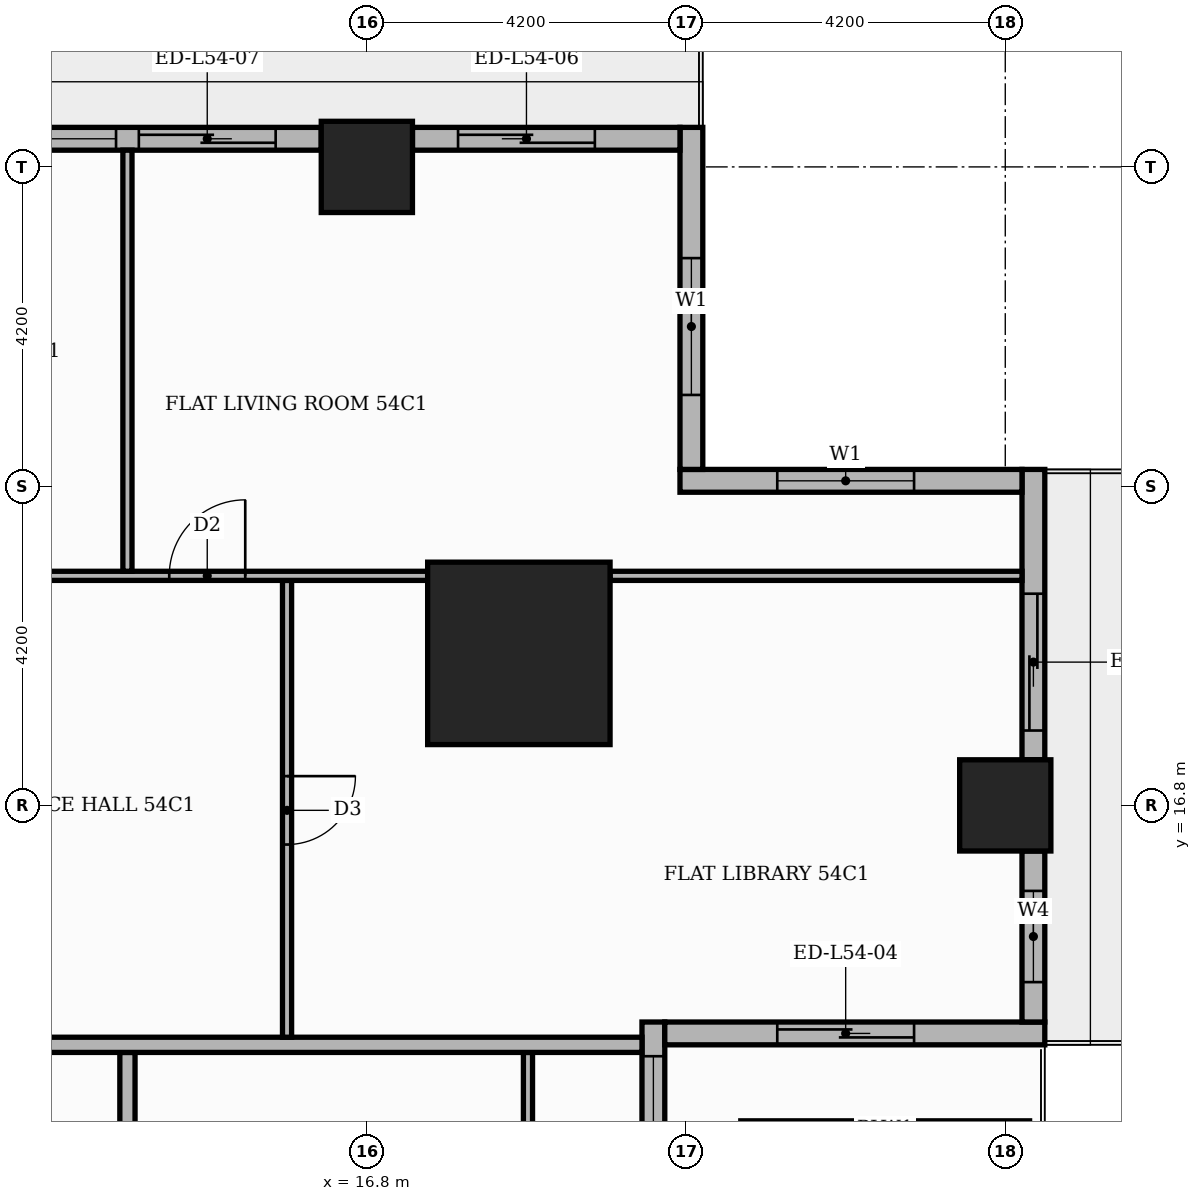
"""IFC4 building model, lengths in metres.
Left out: names, types, materials, properties, quantities, classifications, styles, units other than length and angle.
Written with IfcOpenShell. Run it as: python <this file> out.ifc"""

import sys

from ifc_helpers import new_model, si_unit, direction, frame, frame_2d, origin, origin_2d, place, context, subcontext, project, spatial, rectangle, extrude, element, fill, save


model = new_model("IFC4")
c1 = context("Model", 3, precision=1e-05, world=origin(), true_north=direction((0.0, 1.0)))
c2 = subcontext(c1, "Body", "Model", "MODEL_VIEW")
j1 = project(units=[si_unit("LENGTHUNIT", "METRE"), si_unit("PLANEANGLEUNIT", "RADIAN")], contexts=[c1])
p1 = place(None, origin())
s1 = spatial("IfcSite", under=j1, at=p1, CompositionType="ELEMENT")
p2 = place(p1, origin())
s2 = spatial("IfcBuilding", under=s1, at=p2, CompositionType="ELEMENT")
p3 = place(p2, frame((0.0, 0.0, 227.4)))
s3 = spatial("IfcBuildingStorey", under=s2, at=p3, CompositionType="ELEMENT", Elevation=227.4)
p4 = place(p3, frame((18.8, 18.8, 0.0), z_axis=(0.0, 0.0, 1.0), x_axis=(1.0, 0.0, 0.0)))
e1 = element("IfcColumn", 1, at=p4, inside=s3, PredefinedType="COLUMN", context=c2, shape_type="SweptSolid", body=[
    extrude(rectangle(XDim=2.4, YDim=2.4, at=origin_2d()), origin(), (0.0, 0.0, 1.0), 3.9),
])
for number, where, z_axis, x_axis in (
    (2, (25.2, 16.8, 0.0), (0.0, 0.0, 1.0), (1.0, 0.0, 0.0)),
    (3, (16.8, 25.2, 0.0), (0.0, 0.0, 1.0), (1.0, 0.0, 0.0)),
):
    element("IfcColumn", number, at=place(p3, frame(where, z_axis=z_axis, x_axis=x_axis)), inside=s3, PredefinedType="COLUMN", context=c2, shape_type="SweptSolid", body=[
        extrude(rectangle(XDim=1.2, YDim=1.2, at=origin_2d()), origin(), (0.0, 0.0, 1.0), 3.9),
    ])
p5 = place(p3, frame((20.57, -13.65, 0.0), z_axis=(0.0, 0.0, 1.0), x_axis=(0.0, 1.0, 0.0)))
e4 = element("IfcWall", 4, at=p5, inside=s3, PredefinedType="STANDARD", context=c2, shape_type="SweptSolid", body=[
    extrude(rectangle(XDim=27.6, YDim=0.3, at=frame_2d((13.8, 0.0))), origin(), (0.0, 0.0, 1.0), 3.48),
])
p6 = place(p5, frame((0.15, 0.0, 0.9)))
e5 = element("IfcOpeningElement", 5, at=p6, cuts=e4, PredefinedType="OPENING", context=c2, shape_type="SweptSolid", body=[
    extrude(rectangle(XDim=1.8, YDim=2.1, at=frame_2d((0.9, 1.05))), frame((0.0, 0.16, 0.0), z_axis=(0.0, -1.0, 0.0), x_axis=(1.0, 0.0, 0.0)), (0.0, 0.0, 1.0), 0.32),
])
p7 = place(p5, frame((2.25, 0.0, 0.9)))
e6 = element("IfcOpeningElement", 6, at=p7, cuts=e4, PredefinedType="OPENING", context=c2, shape_type="SweptSolid", body=[
    extrude(rectangle(XDim=6.0, YDim=2.1, at=frame_2d((3.0, 1.05))), frame((0.0, 0.16, 0.0), z_axis=(0.0, -1.0, 0.0), x_axis=(1.0, 0.0, 0.0)), (0.0, 0.0, 1.0), 0.32),
])
p8 = place(p5, frame((8.55, 0.0, 0.9)))
e7 = element("IfcOpeningElement", 7, at=p8, cuts=e4, PredefinedType="OPENING", context=c2, shape_type="SweptSolid", body=[
    extrude(rectangle(XDim=6.0, YDim=2.1, at=frame_2d((3.0, 1.05))), frame((0.0, 0.16, 0.0), z_axis=(0.0, -1.0, 0.0), x_axis=(1.0, 0.0, 0.0)), (0.0, 0.0, 1.0), 0.32),
])
p9 = place(p5, frame((14.85, 0.0, 0.9)))
e8 = element("IfcOpeningElement", 8, at=p9, cuts=e4, PredefinedType="OPENING", context=c2, shape_type="SweptSolid", body=[
    extrude(rectangle(XDim=6.0, YDim=2.1, at=frame_2d((3.0, 1.05))), frame((0.0, 0.16, 0.0), z_axis=(0.0, -1.0, 0.0), x_axis=(1.0, 0.0, 0.0)), (0.0, 0.0, 1.0), 0.32),
])
p10 = place(p5, frame((21.15, 0.0, 0.9)))
e9 = element("IfcOpeningElement", 9, at=p10, cuts=e4, PredefinedType="OPENING", context=c2, shape_type="SweptSolid", body=[
    extrude(rectangle(XDim=6.0, YDim=2.1, at=frame_2d((3.0, 1.05))), frame((0.0, 0.16, 0.0), z_axis=(0.0, -1.0, 0.0), x_axis=(1.0, 0.0, 0.0)), (0.0, 0.0, 1.0), 0.32),
])
p11 = place(p3, frame((20.72, 13.8, 0.0), z_axis=(0.0, 0.0, 1.0), x_axis=(1.0, 0.0, 0.0)))
e10 = element("IfcWall", 10, at=p11, inside=s3, PredefinedType="STANDARD", context=c2, shape_type="SweptSolid", body=[
    extrude(rectangle(XDim=5.0, YDim=0.3, at=frame_2d((2.5, 0.0))), origin(), (0.0, 0.0, 1.0), 3.48),
])
p12 = place(p11, frame((1.48, 0.0, 0.0)))
e11 = element("IfcOpeningElement", 11, at=p12, cuts=e10, PredefinedType="OPENING", context=c2, shape_type="SweptSolid", body=[
    extrude(rectangle(XDim=1.8, YDim=2.4, at=frame_2d((0.9, 1.2))), frame((0.0, 0.16, 0.0), z_axis=(0.0, -1.0, 0.0), x_axis=(1.0, 0.0, 0.0)), (0.0, 0.0, 1.0), 0.32),
])
p13 = place(p3, frame((25.57, 13.95, 0.0), z_axis=(0.0, 0.0, 1.0), x_axis=(0.0, 1.0, 0.0)))
e12 = element("IfcWall", 12, at=p13, inside=s3, PredefinedType="STANDARD", context=c2, shape_type="SweptSolid", body=[
    extrude(rectangle(XDim=2.25, YDim=0.3, at=frame_2d((1.125, 0.0))), origin(), (0.0, 0.0, 1.0), 3.48),
])
p14 = place(p13, frame((0.525, 0.0, 0.9)))
e13 = element("IfcOpeningElement", 13, at=p14, cuts=e12, PredefinedType="OPENING", context=c2, shape_type="SweptSolid", body=[
    extrude(rectangle(XDim=1.2, YDim=2.1, at=frame_2d((0.6, 1.05))), frame((0.0, 0.16, 0.0), z_axis=(0.0, -1.0, 0.0), x_axis=(1.0, 0.0, 0.0)), (0.0, 0.0, 1.0), 0.32),
])
p15 = place(p3, frame((25.57, 17.4, 0.0), z_axis=(0.0, 0.0, 1.0), x_axis=(0.0, 1.0, 0.0)))
e14 = element("IfcWall", 14, at=p15, inside=s3, PredefinedType="STANDARD", context=c2, shape_type="SweptSolid", body=[
    extrude(rectangle(XDim=3.82, YDim=0.3, at=frame_2d((1.91, 0.0))), origin(), (0.0, 0.0, 1.0), 3.48),
])
p16 = place(p15, frame((0.385, 0.0, 0.0)))
e15 = element("IfcOpeningElement", 15, at=p16, cuts=e14, PredefinedType="OPENING", context=c2, shape_type="SweptSolid", body=[
    extrude(rectangle(XDim=1.8, YDim=2.4, at=frame_2d((0.9, 1.2))), frame((0.0, 0.16, 0.0), z_axis=(0.0, -1.0, 0.0), x_axis=(1.0, 0.0, 0.0)), (0.0, 0.0, 1.0), 0.32),
])
p17 = place(p3, frame((25.42, 21.07, 0.0), z_axis=(0.0, 0.0, 1.0), x_axis=(-1.0, 0.0, 0.0)))
e16 = element("IfcWall", 16, at=p17, inside=s3, PredefinedType="STANDARD", context=c2, shape_type="SweptSolid", body=[
    extrude(rectangle(XDim=4.5, YDim=0.3, at=frame_2d((2.25, 0.0))), origin(), (0.0, 0.0, 1.0), 3.48),
])
p18 = place(p17, frame((1.42, 0.0, 0.9)))
e17 = element("IfcOpeningElement", 17, at=p18, cuts=e16, PredefinedType="OPENING", context=c2, shape_type="SweptSolid", body=[
    extrude(rectangle(XDim=1.8, YDim=2.1, at=frame_2d((0.9, 1.05))), frame((0.0, 0.16, 0.0), z_axis=(0.0, -1.0, 0.0), x_axis=(1.0, 0.0, 0.0)), (0.0, 0.0, 1.0), 0.32),
])
p19 = place(p3, frame((21.07, 21.22, 0.0), z_axis=(0.0, 0.0, 1.0), x_axis=(0.0, 1.0, 0.0)))
e18 = element("IfcWall", 18, at=p19, inside=s3, PredefinedType="STANDARD", context=c2, shape_type="SweptSolid", body=[
    extrude(rectangle(XDim=4.5, YDim=0.3, at=frame_2d((2.25, 0.0))), origin(), (0.0, 0.0, 1.0), 3.48),
])
p20 = place(p19, frame((0.98, 0.0, 0.9)))
e19 = element("IfcOpeningElement", 19, at=p20, cuts=e18, PredefinedType="OPENING", context=c2, shape_type="SweptSolid", body=[
    extrude(rectangle(XDim=1.8, YDim=2.1, at=frame_2d((0.9, 1.05))), frame((0.0, 0.16, 0.0), z_axis=(0.0, -1.0, 0.0), x_axis=(1.0, 0.0, 0.0)), (0.0, 0.0, 1.0), 0.32),
])
p21 = place(p3, frame((20.92, 25.57, 0.0), z_axis=(0.0, 0.0, 1.0), x_axis=(-1.0, 0.0, 0.0)))
e20 = element("IfcWall", 20, at=p21, inside=s3, PredefinedType="STANDARD", context=c2, shape_type="SweptSolid", body=[
    extrude(rectangle(XDim=3.52, YDim=0.3, at=frame_2d((1.76, 0.0))), origin(), (0.0, 0.0, 1.0), 3.48),
])
p22 = place(p21, frame((1.12, 0.0, 0.0)))
e21 = element("IfcOpeningElement", 21, at=p22, cuts=e20, PredefinedType="OPENING", context=c2, shape_type="SweptSolid", body=[
    extrude(rectangle(XDim=1.8, YDim=2.4, at=frame_2d((0.9, 1.2))), frame((0.0, 0.16, 0.0), z_axis=(0.0, -1.0, 0.0), x_axis=(1.0, 0.0, 0.0)), (0.0, 0.0, 1.0), 0.32),
])
p23 = place(p3, frame((16.2, 25.57, 0.0), z_axis=(0.0, 0.0, 1.0), x_axis=(-1.0, 0.0, 0.0)))
e22 = element("IfcWall", 22, at=p23, inside=s3, PredefinedType="STANDARD", context=c2, shape_type="SweptSolid", body=[
    extrude(rectangle(XDim=7.2, YDim=0.3, at=frame_2d((3.6, 0.0))), origin(), (0.0, 0.0, 1.0), 3.48),
])
p24 = place(p23, frame((0.6, 0.0, 0.0)))
e23 = element("IfcOpeningElement", 23, at=p24, cuts=e22, PredefinedType="OPENING", context=c2, shape_type="SweptSolid", body=[
    extrude(rectangle(XDim=1.8, YDim=2.4, at=frame_2d((0.9, 1.2))), frame((0.0, 0.16, 0.0), z_axis=(0.0, -1.0, 0.0), x_axis=(1.0, 0.0, 0.0)), (0.0, 0.0, 1.0), 0.32),
])
p25 = place(p23, frame((2.7, 0.0, 0.9)))
e24 = element("IfcOpeningElement", 24, at=p25, cuts=e22, PredefinedType="OPENING", context=c2, shape_type="SweptSolid", body=[
    extrude(rectangle(XDim=3.9, YDim=2.1, at=frame_2d((1.95, 1.05))), frame((0.0, 0.16, 0.0), z_axis=(0.0, -1.0, 0.0), x_axis=(1.0, 0.0, 0.0)), (0.0, 0.0, 1.0), 0.32),
])
p26 = place(p3, frame((18.92, 9.36, 0.0), z_axis=(0.0, 0.0, 1.0), x_axis=(0.0, 1.0, 0.0)))
e25 = element("IfcWall", 25, at=p26, inside=s3, PredefinedType="PARTITIONING", context=c2, shape_type="SweptSolid", body=[
    extrude(rectangle(XDim=4.19, YDim=0.12, at=frame_2d((2.095, 0.0))), origin(), (0.0, 0.0, 1.0), 3.48),
])
p27 = place(p26, frame((1.665, 0.0, 0.0)))
e26 = element("IfcOpeningElement", 26, at=p27, cuts=e25, PredefinedType="OPENING", context=c2, shape_type="SweptSolid", body=[
    extrude(rectangle(XDim=0.9, YDim=2.1, at=frame_2d((0.45, 1.05))), frame((0.0, 0.07, 0.0), z_axis=(0.0, -1.0, 0.0), x_axis=(1.0, 0.0, 0.0)), (0.0, 0.0, 1.0), 0.14),
])
p28 = place(p3, frame((13.65, 11.1, 0.0), z_axis=(0.0, 0.0, 1.0), x_axis=(0.0, 1.0, 0.0)))
e27 = element("IfcWall", 27, at=p28, inside=s3, PredefinedType="PARTITIONING", context=c2, shape_type="SweptSolid", body=[
    extrude(rectangle(XDim=2.45, YDim=0.2, at=frame_2d((1.225, 0.0))), origin(), (0.0, 0.0, 1.0), 3.48),
])
p29 = place(p3, frame((-13.65, 13.65, 0.0), z_axis=(0.0, 0.0, 1.0), x_axis=(1.0, 0.0, 0.0)))
e28 = element("IfcWall", 28, at=p29, inside=s3, PredefinedType="PARTITIONING", context=c2, shape_type="SweptSolid", body=[
    extrude(rectangle(XDim=34.07, YDim=0.2, at=frame_2d((17.035, 0.0))), origin(), (0.0, 0.0, 1.0), 3.48),
])
p30 = place(p29, frame((24.65, 0.0, 0.0)))
e29 = element("IfcOpeningElement", 29, at=p30, cuts=e28, PredefinedType="OPENING", context=c2, shape_type="SweptSolid", body=[
    extrude(rectangle(XDim=1.1, YDim=2.4, at=frame_2d((0.55, 1.2))), frame((0.0, 0.11, 0.0), z_axis=(0.0, -1.0, 0.0), x_axis=(1.0, 0.0, 0.0)), (0.0, 0.0, 1.0), 0.22),
])
p31 = place(p3, frame((15.75, 13.75, 0.0), z_axis=(0.0, 0.0, 1.0), x_axis=(0.0, 1.0, 0.0)))
e30 = element("IfcWall", 30, at=p31, inside=s3, PredefinedType="PARTITIONING", context=c2, shape_type="SweptSolid", body=[
    extrude(rectangle(XDim=6.01, YDim=0.12, at=frame_2d((3.005, 0.0))), origin(), (0.0, 0.0, 1.0), 3.48),
])
p32 = place(p31, frame((2.535, 0.0, 0.0)))
e31 = element("IfcOpeningElement", 31, at=p32, cuts=e30, PredefinedType="OPENING", context=c2, shape_type="SweptSolid", body=[
    extrude(rectangle(XDim=0.9, YDim=2.1, at=frame_2d((0.45, 1.05))), frame((0.0, 0.07, 0.0), z_axis=(0.0, -1.0, 0.0), x_axis=(1.0, 0.0, 0.0)), (0.0, 0.0, 1.0), 0.14),
])
p33 = place(p3, frame((-13.55, 19.82, 0.0), z_axis=(0.0, 0.0, 1.0), x_axis=(1.0, 0.0, 0.0)))
e32 = element("IfcWall", 32, at=p33, inside=s3, PredefinedType="PARTITIONING", context=c2, shape_type="SweptSolid", body=[
    extrude(rectangle(XDim=31.15, YDim=0.12, at=frame_2d((15.575, 0.0))), origin(), (0.0, 0.0, 1.0), 3.48),
])
p34 = place(p33, frame((27.75, 0.0, 0.0)))
e33 = element("IfcOpeningElement", 33, at=p34, cuts=e32, PredefinedType="OPENING", context=c2, shape_type="SweptSolid", body=[
    extrude(rectangle(XDim=1.0, YDim=2.1, at=frame_2d((0.5, 1.05))), frame((0.0, 0.07, 0.0), z_axis=(0.0, -1.0, 0.0), x_axis=(1.0, 0.0, 0.0)), (0.0, 0.0, 1.0), 0.14),
])
p35 = place(p33, frame((24.65, 0.0, 0.0)))
e34 = element("IfcOpeningElement", 34, at=p35, cuts=e32, PredefinedType="OPENING", context=c2, shape_type="SweptSolid", body=[
    extrude(rectangle(XDim=0.9, YDim=2.1, at=frame_2d((0.45, 1.05))), frame((0.0, 0.07, 0.0), z_axis=(0.0, -1.0, 0.0), x_axis=(1.0, 0.0, 0.0)), (0.0, 0.0, 1.0), 0.14),
])
p36 = place(p33, frame((19.4, 0.0, 0.0)))
e35 = element("IfcOpeningElement", 35, at=p36, cuts=e32, PredefinedType="OPENING", context=c2, shape_type="SweptSolid", body=[
    extrude(rectangle(XDim=0.9, YDim=2.1, at=frame_2d((0.45, 1.05))), frame((0.0, 0.07, 0.0), z_axis=(0.0, -1.0, 0.0), x_axis=(1.0, 0.0, 0.0)), (0.0, 0.0, 1.0), 0.14),
])
p37 = place(p33, frame((9.95, 0.0, 0.0)))
e36 = element("IfcOpeningElement", 36, at=p37, cuts=e32, PredefinedType="OPENING", context=c2, shape_type="SweptSolid", body=[
    extrude(rectangle(XDim=0.9, YDim=2.1, at=frame_2d((0.45, 1.05))), frame((0.0, 0.07, 0.0), z_axis=(0.0, -1.0, 0.0), x_axis=(1.0, 0.0, 0.0)), (0.0, 0.0, 1.0), 0.14),
])
p38 = place(p33, frame((3.65, 0.0, 0.0)))
e37 = element("IfcOpeningElement", 37, at=p38, cuts=e32, PredefinedType="OPENING", context=c2, shape_type="SweptSolid", body=[
    extrude(rectangle(XDim=0.9, YDim=2.1, at=frame_2d((0.45, 1.05))), frame((0.0, 0.07, 0.0), z_axis=(0.0, -1.0, 0.0), x_axis=(1.0, 0.0, 0.0)), (0.0, 0.0, 1.0), 0.14),
])
p39 = place(p3, frame((20.0, 19.82, 0.0), z_axis=(0.0, 0.0, 1.0), x_axis=(1.0, 0.0, 0.0)))
e38 = element("IfcWall", 38, at=p39, inside=s3, PredefinedType="PARTITIONING", context=c2, shape_type="SweptSolid", body=[
    extrude(rectangle(XDim=5.42, YDim=0.12, at=frame_2d((2.71, 0.0))), origin(), (0.0, 0.0, 1.0), 3.48),
])
p40 = place(p3, frame((13.65, 19.88, 0.0), z_axis=(0.0, 0.0, 1.0), x_axis=(0.0, 1.0, 0.0)))
e39 = element("IfcWall", 39, at=p40, inside=s3, PredefinedType="PARTITIONING", context=c2, shape_type="SweptSolid", body=[
    extrude(rectangle(XDim=5.54, YDim=0.12, at=frame_2d((2.77, 0.0))), origin(), (0.0, 0.0, 1.0), 3.48),
])
p41 = place(p10, origin())
e40 = element("IfcWindow", 40, at=p41, inside=s3, PartitioningType="SINGLE_PANEL", PredefinedType="WINDOW", context=c2, shape_type="SweptSolid", body=[
    extrude(rectangle(XDim=6.0, YDim=2.1, at=frame_2d((3.0, 1.05))), frame((0.0, 0.03, 0.0), z_axis=(0.0, -1.0, 0.0), x_axis=(1.0, 0.0, 0.0)), (0.0, 0.0, 1.0), 0.06),
])
fill(e9, e40)
p42 = place(p12, origin())
e41 = element("IfcDoor", 41, at=p42, inside=s3, OperationType="SLIDING_TO_RIGHT", PredefinedType="DOOR", context=c2, shape_type="SweptSolid", body=[
    extrude(rectangle(XDim=1.8, YDim=2.4, at=frame_2d((0.9, 1.2))), frame((0.0, 0.025, 0.0), z_axis=(0.0, -1.0, 0.0), x_axis=(1.0, 0.0, 0.0)), (0.0, 0.0, 1.0), 0.05),
])
fill(e11, e41)
p43 = place(p14, origin())
e42 = element("IfcWindow", 42, at=p43, inside=s3, PartitioningType="SINGLE_PANEL", PredefinedType="WINDOW", context=c2, shape_type="SweptSolid", body=[
    extrude(rectangle(XDim=1.2, YDim=2.1, at=frame_2d((0.6, 1.05))), frame((0.0, 0.03, 0.0), z_axis=(0.0, -1.0, 0.0), x_axis=(1.0, 0.0, 0.0)), (0.0, 0.0, 1.0), 0.06),
])
fill(e13, e42)
p44 = place(p16, origin())
e43 = element("IfcDoor", 43, at=p44, inside=s3, OperationType="SLIDING_TO_LEFT", PredefinedType="DOOR", context=c2, shape_type="SweptSolid", body=[
    extrude(rectangle(XDim=1.8, YDim=2.4, at=frame_2d((0.9, 1.2))), frame((0.0, 0.025, 0.0), z_axis=(0.0, -1.0, 0.0), x_axis=(1.0, 0.0, 0.0)), (0.0, 0.0, 1.0), 0.05),
])
fill(e15, e43)
p45 = place(p18, origin())
e44 = element("IfcWindow", 44, at=p45, inside=s3, PartitioningType="SINGLE_PANEL", PredefinedType="WINDOW", context=c2, shape_type="SweptSolid", body=[
    extrude(rectangle(XDim=1.8, YDim=2.1, at=frame_2d((0.9, 1.05))), frame((0.0, 0.03, 0.0), z_axis=(0.0, -1.0, 0.0), x_axis=(1.0, 0.0, 0.0)), (0.0, 0.0, 1.0), 0.06),
])
fill(e17, e44)
p46 = place(p20, origin())
e45 = element("IfcWindow", 45, at=p46, inside=s3, PartitioningType="SINGLE_PANEL", PredefinedType="WINDOW", context=c2, shape_type="SweptSolid", body=[
    extrude(rectangle(XDim=1.8, YDim=2.1, at=frame_2d((0.9, 1.05))), frame((0.0, 0.03, 0.0), z_axis=(0.0, -1.0, 0.0), x_axis=(1.0, 0.0, 0.0)), (0.0, 0.0, 1.0), 0.06),
])
fill(e19, e45)
p47 = place(p22, origin())
e46 = element("IfcDoor", 46, at=p47, inside=s3, OperationType="SLIDING_TO_RIGHT", PredefinedType="DOOR", context=c2, shape_type="SweptSolid", body=[
    extrude(rectangle(XDim=1.8, YDim=2.4, at=frame_2d((0.9, 1.2))), frame((0.0, 0.025, 0.0), z_axis=(0.0, -1.0, 0.0), x_axis=(1.0, 0.0, 0.0)), (0.0, 0.0, 1.0), 0.05),
])
fill(e21, e46)
p48 = place(p24, origin())
e47 = element("IfcDoor", 47, at=p48, inside=s3, OperationType="SLIDING_TO_LEFT", PredefinedType="DOOR", context=c2, shape_type="SweptSolid", body=[
    extrude(rectangle(XDim=1.8, YDim=2.4, at=frame_2d((0.9, 1.2))), frame((0.0, 0.025, 0.0), z_axis=(0.0, -1.0, 0.0), x_axis=(1.0, 0.0, 0.0)), (0.0, 0.0, 1.0), 0.05),
])
fill(e23, e47)
p49 = place(p25, origin())
e48 = element("IfcWindow", 48, at=p49, inside=s3, PartitioningType="SINGLE_PANEL", PredefinedType="WINDOW", context=c2, shape_type="SweptSolid", body=[
    extrude(rectangle(XDim=3.9, YDim=2.1, at=frame_2d((1.95, 1.05))), frame((0.0, 0.03, 0.0), z_axis=(0.0, -1.0, 0.0), x_axis=(1.0, 0.0, 0.0)), (0.0, 0.0, 1.0), 0.06),
])
fill(e24, e48)
p50 = place(p32, frame((0.9, 0.0, 0.0), z_axis=(0.0, 0.0, 1.0), x_axis=(-1.0, 0.0, 0.0)))
e49 = element("IfcDoor", 49, at=p50, inside=s3, OperationType="SINGLE_SWING_RIGHT", PredefinedType="DOOR", context=c2, shape_type="SweptSolid", body=[
    extrude(rectangle(XDim=0.9, YDim=2.1, at=frame_2d((0.45, 1.05))), frame((0.0, 0.025, 0.0), z_axis=(0.0, -1.0, 0.0), x_axis=(1.0, 0.0, 0.0)), (0.0, 0.0, 1.0), 0.05),
])
fill(e31, e49)
p51 = place(p34, origin())
e50 = element("IfcDoor", 50, at=p51, inside=s3, OperationType="SINGLE_SWING_RIGHT", PredefinedType="DOOR", context=c2, shape_type="SweptSolid", body=[
    extrude(rectangle(XDim=1.0, YDim=2.1, at=frame_2d((0.5, 1.05))), frame((0.0, 0.025, 0.0), z_axis=(0.0, -1.0, 0.0), x_axis=(1.0, 0.0, 0.0)), (0.0, 0.0, 1.0), 0.05),
])
fill(e33, e50)
save(model, sys.argv[1])
